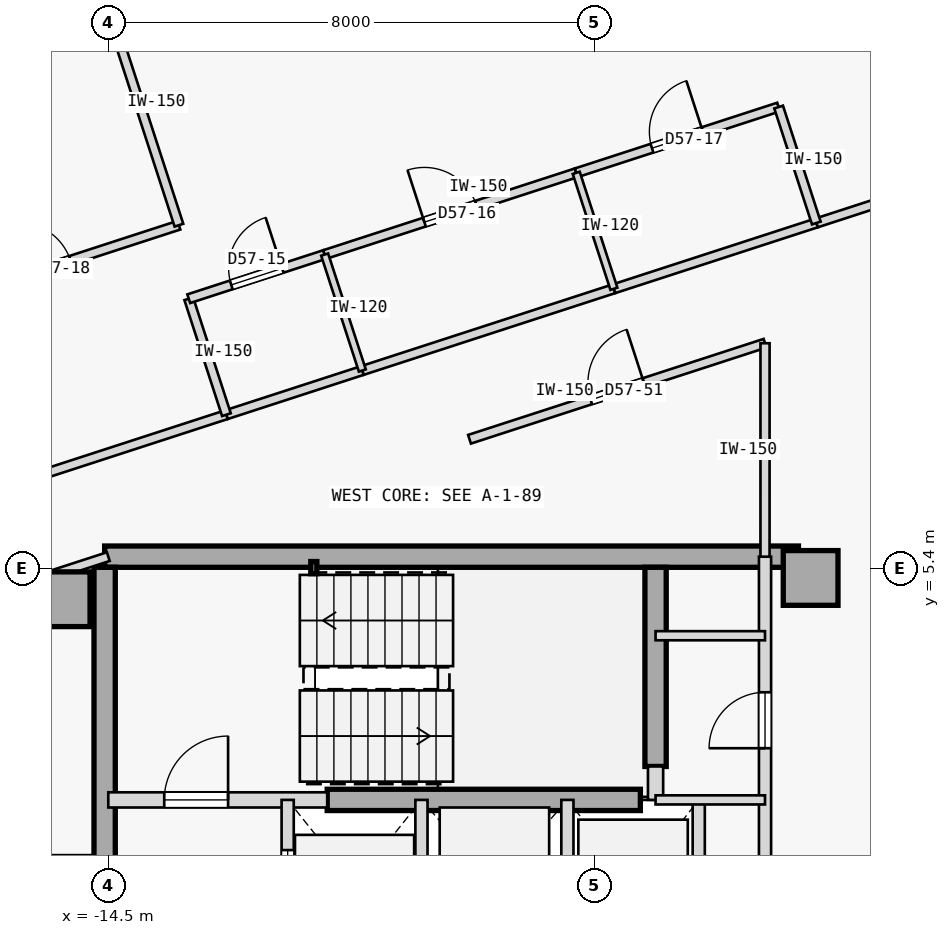
"""IFC4 building model, lengths in metres.
Left out: names, types, materials, properties, quantities, classifications, styles, units other than length and angle.
Written with IfcOpenShell. Run it as: python <this file> out.ifc"""

import sys

from ifc_helpers import new_model, si_unit, direction, frame, frame_2d, origin, origin_2d, place, context, subcontext, project, spatial, rectangle, hollow_rectangle, extrude, element, fill, save


model = new_model("IFC4")
c1 = context("Model", 3, precision=1e-05, world=origin(), true_north=direction((0.0, 1.0)))
c2 = subcontext(c1, "Body", "Model", "MODEL_VIEW")
j1 = project(units=[si_unit("LENGTHUNIT", "METRE"), si_unit("PLANEANGLEUNIT", "RADIAN")], contexts=[c1])
p1 = place(None, origin())
s1 = spatial("IfcSite", under=j1, at=p1, CompositionType="ELEMENT")
p2 = place(p1, origin())
s2 = spatial("IfcBuilding", under=s1, at=p2, CompositionType="ELEMENT")
p3 = place(p2, frame((0.0, 0.0, 217.6)))
s3 = spatial("IfcBuildingStorey", under=s2, at=p3, CompositionType="ELEMENT", Elevation=217.6)
for number, where, z_axis, x_axis in (
    (1, (-15.25, 4.9, 0.0), (0.0, 0.0, 1.0), (1.0, 0.0, 0.0)),
    (2, (-2.95, 5.25, 0.0), (0.0, 0.0, 1.0), (1.0, 0.0, 0.0)),
):
    element("IfcColumn", number, at=place(p3, frame(where, z_axis=z_axis, x_axis=x_axis)), inside=s3, PredefinedType="COLUMN", context=c2, shape_type="SweptSolid", body=[
        extrude(rectangle(XDim=0.9, YDim=0.9, at=origin_2d()), origin(), (0.0, 0.0, 1.0), 3.35),
    ])
p4 = place(p3, frame((-14.56, 5.6, 0.0), z_axis=(0.0, 0.0, 1.0), x_axis=(1.0, 0.0, 0.0)))
e3 = element("IfcWall", 3, at=p4, inside=s3, PredefinedType="SHEAR", context=c2, shape_type="SweptSolid", body=[
    extrude(rectangle(XDim=11.41, YDim=0.35, at=frame_2d((5.705, 0.0))), origin(), (0.0, 0.0, 1.0), 3.125),
])
p5 = place(p3, frame((-14.56, -5.425, 0.0), z_axis=(0.0, 0.0, 1.0), x_axis=(0.0, 1.0, 0.0)))
e4 = element("IfcWall", 4, at=p5, inside=s3, PredefinedType="SHEAR", context=c2, shape_type="SweptSolid", body=[
    extrude(rectangle(XDim=10.85, YDim=0.35, at=frame_2d((5.425, 0.0))), origin(), (0.0, 0.0, 1.0), 3.125),
])
p6 = place(p3, frame((-5.5, 2.15, 0.0), z_axis=(0.0, 0.0, 1.0), x_axis=(0.0, 1.0, 0.0)))
e5 = element("IfcWall", 5, at=p6, inside=s3, PredefinedType="SHEAR", context=c2, shape_type="SweptSolid", body=[
    extrude(rectangle(XDim=3.275, YDim=0.35, at=frame_2d((1.638, 0.0))), origin(), (0.0, 0.0, 1.0), 3.125),
])
p7 = place(p3, frame((-10.9, 1.6, 0.0), z_axis=(0.0, 0.0, 1.0), x_axis=(1.0, 0.0, 0.0)))
e6 = element("IfcWall", 6, at=p7, inside=s3, PredefinedType="SHEAR", context=c2, shape_type="SweptSolid", body=[
    extrude(rectangle(XDim=5.15, YDim=0.35, at=frame_2d((2.575, 0.0))), origin(), (0.0, 0.0, 1.0), 3.125),
])
p8 = place(p3, frame((-11.12, 5.42, 0.0), z_axis=(0.0, 0.0, 1.0), x_axis=(1.0, 0.0, 0.0)))
e7 = element("IfcColumn", 7, at=p8, inside=s3, PredefinedType="COLUMN", context=c2, shape_type="SweptSolid", body=[
    extrude(hollow_rectangle(XDim=0.1, YDim=0.2, WallThickness=0.008, at=origin_2d()), origin(), (0.0, 0.0, 1.0), 3.35),
])
p9 = place(p3, frame((-14.5, 1.6, 0.0), z_axis=(0.0, 0.0, 1.0), x_axis=(1.0, 0.0, 0.0)))
e8 = element("IfcWall", 8, at=p9, inside=s3, PredefinedType="STANDARD", context=c2, shape_type="SweptSolid", body=[
    extrude(rectangle(XDim=3.6, YDim=0.25, at=frame_2d((1.8, 0.0))), origin(), (0.0, 0.0, 1.0), 3.125),
])
p10 = place(p9, frame((0.92, 0.0, 0.0)))
e9 = element("IfcOpeningElement", 9, at=p10, cuts=e8, PredefinedType="OPENING", context=c2, shape_type="SweptSolid", body=[
    extrude(rectangle(XDim=1.05, YDim=2.15, at=frame_2d((0.525, 1.075))), frame((0.0, 0.135, 0.0), z_axis=(0.0, -1.0, 0.0), x_axis=(1.0, 0.0, 0.0)), (0.0, 0.0, 1.0), 0.27),
])
p11 = place(p3, frame((-5.5, 1.6, 0.0), z_axis=(0.0, 0.0, 1.0), x_axis=(0.0, 1.0, 0.0)))
e10 = element("IfcWall", 10, at=p11, inside=s3, PredefinedType="STANDARD", context=c2, shape_type="SweptSolid", body=[
    extrude(rectangle(XDim=0.55, YDim=0.25, at=frame_2d((0.275, 0.0))), origin(), (0.0, 0.0, 1.0), 3.125),
])
p12 = place(p3, frame((-3.7, -1.15, 0.0), z_axis=(0.0, 0.0, 1.0), x_axis=(0.0, 1.0, 0.0)))
e11 = element("IfcWall", 11, at=p12, inside=s3, PredefinedType="STANDARD", context=c2, shape_type="SweptSolid", body=[
    extrude(rectangle(XDim=6.75, YDim=0.2, at=frame_2d((3.375, 0.0))), origin(), (0.0, 0.0, 1.0), 3.125),
])
p13 = place(p12, frame((3.6, 0.0, 0.0)))
e12 = element("IfcOpeningElement", 12, at=p13, cuts=e11, PredefinedType="OPENING", context=c2, shape_type="SweptSolid", body=[
    extrude(rectangle(XDim=0.92, YDim=2.15, at=frame_2d((0.46, 1.075))), frame((0.0, 0.11, 0.0), z_axis=(0.0, -1.0, 0.0), x_axis=(1.0, 0.0, 0.0)), (0.0, 0.0, 1.0), 0.22),
])
p14 = place(p12, frame((0.85, 0.0, 0.0)))
e13 = element("IfcOpeningElement", 13, at=p14, cuts=e11, PredefinedType="OPENING", context=c2, shape_type="SweptSolid", body=[
    extrude(rectangle(XDim=0.9, YDim=2.15, at=frame_2d((0.45, 1.075))), frame((0.0, 0.11, 0.0), z_axis=(0.0, -1.0, 0.0), x_axis=(1.0, 0.0, 0.0)), (0.0, 0.0, 1.0), 0.22),
])
p15 = place(p3, frame((-11.55, -1.15, 0.0), z_axis=(0.0, 0.0, 1.0), x_axis=(0.0, 1.0, 0.0)))
e14 = element("IfcWall", 14, at=p15, inside=s3, PredefinedType="STANDARD", context=c2, shape_type="SweptSolid", body=[
    extrude(rectangle(XDim=2.75, YDim=0.2, at=frame_2d((1.375, 0.0))), origin(), (0.0, 0.0, 1.0), 3.125),
])
p16 = place(p15, frame((0.825, 0.0, 0.0)))
e15 = element("IfcOpeningElement", 15, at=p16, cuts=e14, PredefinedType="OPENING", context=c2, shape_type="SweptSolid", body=[
    extrude(rectangle(XDim=1.1, YDim=2.15, at=frame_2d((0.55, 1.075))), frame((0.0, 0.11, 0.0), z_axis=(0.0, -1.0, 0.0), x_axis=(1.0, 0.0, 0.0)), (0.0, 0.0, 1.0), 0.22),
])
for number, where, z_axis, x_axis in (
    (16, (-9.35, -1.15, 0.0), (0.0, 0.0, 1.0), (0.0, 1.0, 0.0)),
    (17, (-6.95, -1.15, 0.0), (0.0, 0.0, 1.0), (0.0, 1.0, 0.0)),
    (18, (-4.79, -1.15, 0.0), (0.0, 0.0, 1.0), (0.0, 1.0, 0.0)),
):
    element("IfcWall", number, at=place(p3, frame(where, z_axis=z_axis, x_axis=x_axis)), inside=s3, PredefinedType="STANDARD", context=c2, shape_type="SweptSolid", body=[
        extrude(rectangle(XDim=2.75, YDim=0.2, at=frame_2d((1.375, 0.0))), origin(), (0.0, 0.0, 1.0), 3.125),
    ])
for number, where, z_axis, x_axis in (
    (19, (-5.5, 4.3, 0.0), (0.0, 0.0, 1.0), (1.0, 0.0, 0.0)),
    (20, (-5.5, 1.6, 0.0), (0.0, 0.0, 1.0), (1.0, 0.0, 0.0)),
):
    element("IfcWall", number, at=place(p3, frame(where, z_axis=z_axis, x_axis=x_axis)), inside=s3, PredefinedType="PARTITIONING", context=c2, shape_type="SweptSolid", body=[
        extrude(rectangle(XDim=1.8, YDim=0.15, at=frame_2d((0.9, 0.0))), origin(), (0.0, 0.0, 1.0), 3.125),
    ])
p17 = place(p3, frame((-16.865, 6.535, 0.0), z_axis=(0.0, 0.0, 1.0), x_axis=(0.951049118272, 0.309039762222, 0.0)))
e21 = element("IfcWall", 21, at=p17, inside=s3, PredefinedType="PARTITIONING", context=c2, shape_type="SweptSolid", body=[
    extrude(rectangle(XDim=4.53, YDim=0.15, at=frame_2d((2.265, 0.0))), origin(), (0.0, 0.0, 1.0), 3.125),
])
p18 = place(p3, frame((-2.856, 11.087, 0.0), z_axis=(0.0, 0.0, 1.0), x_axis=(0.95106314138, 0.308996603718, 0.0)))
e22 = element("IfcWall", 22, at=p18, inside=s3, PredefinedType="PARTITIONING", context=c2, shape_type="SweptSolid", body=[
    extrude(rectangle(XDim=5.862, YDim=0.15, at=frame_2d((2.931, 0.0))), origin(), (0.0, 0.0, 1.0), 3.125),
])
p19 = place(p18, frame((2.456, 0.0, 0.0)))
e23 = element("IfcOpeningElement", 23, at=p19, cuts=e22, PredefinedType="OPENING", context=c2, shape_type="SweptSolid", body=[
    extrude(rectangle(XDim=0.95, YDim=2.15, at=frame_2d((0.475, 1.075))), frame((0.0, 0.085, 0.0), z_axis=(0.0, -1.0, 0.0), x_axis=(1.0, 0.0, 0.0)), (0.0, 0.0, 1.0), 0.17),
])
p20 = place(p3, frame((-12.557, 7.935, 0.0), z_axis=(0.0, 0.0, 1.0), x_axis=(0.951045519245, 0.309050837767, 0.0)))
e24 = element("IfcWall", 24, at=p20, inside=s3, PredefinedType="PARTITIONING", context=c2, shape_type="SweptSolid", body=[
    extrude(rectangle(XDim=2.35, YDim=0.15, at=frame_2d((1.175, 0.0))), origin(), (0.0, 0.0, 1.0), 3.125),
])
p21 = place(p3, frame((-10.322, 8.661, 0.0), z_axis=(0.0, 0.0, 1.0), x_axis=(0.951052627573, 0.309028962374, 0.0)))
e25 = element("IfcWall", 25, at=p21, inside=s3, PredefinedType="PARTITIONING", context=c2, shape_type="SweptSolid", body=[
    extrude(rectangle(XDim=4.35, YDim=0.15, at=frame_2d((2.175, 0.0))), origin(), (0.0, 0.0, 1.0), 3.125),
])
p22 = place(p3, frame((-6.185, 10.006, 0.0), z_axis=(0.0, 0.0, 1.0), x_axis=(0.951062257173, 0.308999325213, 0.0)))
e26 = element("IfcWall", 26, at=p22, inside=s3, PredefinedType="PARTITIONING", context=c2, shape_type="SweptSolid", body=[
    extrude(rectangle(XDim=3.5, YDim=0.15, at=frame_2d((1.75, 0.0))), origin(), (0.0, 0.0, 1.0), 3.125),
])
p23 = place(p3, frame((-17.792, 4.531, 0.0), z_axis=(0.0, 0.0, 1.0), x_axis=(0.951047546178, 0.309044600193, 0.0)))
e27 = element("IfcWall", 27, at=p23, inside=s3, PredefinedType="PARTITIONING", context=c2, shape_type="SweptSolid", body=[
    extrude(rectangle(XDim=3.461, YDim=0.15, at=frame_2d((1.73, 0.0))), origin(), (0.0, 0.0, 1.0), 3.125),
])
p24 = place(p23, frame((0.302, 0.0, 0.0)))
e28 = element("IfcOpeningElement", 28, at=p24, cuts=e27, PredefinedType="OPENING", context=c2, shape_type="SweptSolid", body=[
    extrude(rectangle(XDim=0.92, YDim=2.15, at=frame_2d((0.46, 1.075))), frame((0.0, 0.085, 0.0), z_axis=(0.0, -1.0, 0.0), x_axis=(1.0, 0.0, 0.0)), (0.0, 0.0, 1.0), 0.17),
])
p25 = place(p3, frame((-8.56, 7.531, 0.0), z_axis=(0.0, 0.0, 1.0), x_axis=(0.951054430751, 0.309023412946, 0.0)))
e29 = element("IfcWall", 29, at=p25, inside=s3, PredefinedType="PARTITIONING", context=c2, shape_type="SweptSolid", body=[
    extrude(rectangle(XDim=5.11, YDim=0.15, at=frame_2d((2.555, 0.0))), origin(), (0.0, 0.0, 1.0), 3.125),
])
p26 = place(p25, frame((2.095, 0.0, 0.0)))
e30 = element("IfcOpeningElement", 30, at=p26, cuts=e29, PredefinedType="OPENING", context=c2, shape_type="SweptSolid", body=[
    extrude(rectangle(XDim=0.92, YDim=2.15, at=frame_2d((0.46, 1.075))), frame((0.0, 0.085, 0.0), z_axis=(0.0, -1.0, 0.0), x_axis=(1.0, 0.0, 0.0)), (0.0, 0.0, 1.0), 0.17),
])
p27 = place(p3, frame((-3.7, 5.6, 0.0), z_axis=(0.0, 0.0, 1.0), x_axis=(0.000139120755, 0.999999990323, 0.0)))
e31 = element("IfcWall", 31, at=p27, inside=s3, PredefinedType="PARTITIONING", context=c2, shape_type="SweptSolid", body=[
    extrude(rectangle(XDim=3.51, YDim=0.15, at=frame_2d((1.755, 0.0))), origin(), (0.0, 0.0, 1.0), 3.125),
])
p28 = place(p3, frame((-12.557, 7.935, 0.0), z_axis=(0.0, 0.0, 1.0), x_axis=(-0.308912611775, 0.951090425925, 0.0)))
e32 = element("IfcWall", 32, at=p28, inside=s3, PredefinedType="PARTITIONING", context=c2, shape_type="SweptSolid", body=[
    extrude(rectangle(XDim=2.005, YDim=0.15, at=frame_2d((1.002, 0.0))), origin(), (0.0, 0.0, 1.0), 3.125),
])
p29 = place(p3, frame((-13.177, 9.842, 0.0), z_axis=(0.0, 0.0, 1.0), x_axis=(0.951066131077, 0.308987401554, 0.0)))
e33 = element("IfcWall", 33, at=p29, inside=s3, PredefinedType="PARTITIONING", context=c2, shape_type="SweptSolid", body=[
    extrude(rectangle(XDim=2.35, YDim=0.15, at=frame_2d((1.175, 0.0))), origin(), (0.0, 0.0, 1.0), 3.125),
])
p30 = place(p29, frame((0.735, 0.0, 0.0)))
e34 = element("IfcOpeningElement", 34, at=p30, cuts=e33, PredefinedType="OPENING", context=c2, shape_type="SweptSolid", body=[
    extrude(rectangle(XDim=0.88, YDim=2.15, at=frame_2d((0.44, 1.075))), frame((0.0, 0.085, 0.0), z_axis=(0.0, -1.0, 0.0), x_axis=(1.0, 0.0, 0.0)), (0.0, 0.0, 1.0), 0.17),
])
p31 = place(p3, frame((-10.942, 10.568, 0.0), z_axis=(0.0, 0.0, 1.0), x_axis=(0.951057987102, 0.309012467661, 0.0)))
e35 = element("IfcWall", 35, at=p31, inside=s3, PredefinedType="PARTITIONING", context=c2, shape_type="SweptSolid", body=[
    extrude(rectangle(XDim=4.35, YDim=0.15, at=frame_2d((2.175, 0.0))), origin(), (0.0, 0.0, 1.0), 3.125),
])
p32 = place(p31, frame((1.725, 0.0, 0.0)))
e36 = element("IfcOpeningElement", 36, at=p32, cuts=e35, PredefinedType="OPENING", context=c2, shape_type="SweptSolid", body=[
    extrude(rectangle(XDim=0.9, YDim=2.15, at=frame_2d((0.45, 1.075))), frame((0.0, 0.085, 0.0), z_axis=(0.0, -1.0, 0.0), x_axis=(1.0, 0.0, 0.0)), (0.0, 0.0, 1.0), 0.17),
])
p33 = place(p3, frame((-6.805, 11.912, 0.0), z_axis=(0.0, 0.0, 1.0), x_axis=(0.951055596592, 0.309019824916, 0.0)))
e37 = element("IfcWall", 37, at=p33, inside=s3, PredefinedType="PARTITIONING", context=c2, shape_type="SweptSolid", body=[
    extrude(rectangle(XDim=3.5, YDim=0.15, at=frame_2d((1.75, 0.0))), origin(), (0.0, 0.0, 1.0), 3.125),
])
p34 = place(p33, frame((1.31, 0.0, 0.0)))
e38 = element("IfcOpeningElement", 38, at=p34, cuts=e37, PredefinedType="OPENING", context=c2, shape_type="SweptSolid", body=[
    extrude(rectangle(XDim=0.88, YDim=2.15, at=frame_2d((0.44, 1.075))), frame((0.0, 0.085, 0.0), z_axis=(0.0, -1.0, 0.0), x_axis=(1.0, 0.0, 0.0)), (0.0, 0.0, 1.0), 0.17),
])
p35 = place(p3, frame((-2.856, 11.087, 0.0), z_axis=(0.0, 0.0, 1.0), x_axis=(-0.309058537449, 0.951043017129, 0.0)))
e39 = element("IfcWall", 39, at=p35, inside=s3, PredefinedType="PARTITIONING", context=c2, shape_type="SweptSolid", body=[
    extrude(rectangle(XDim=2.005, YDim=0.15, at=frame_2d((1.002, 0.0))), origin(), (0.0, 0.0, 1.0), 3.125),
])
p36 = place(p3, frame((-17.761, 9.614, 0.0), z_axis=(0.0, 0.0, 1.0), x_axis=(0.951050272606, 0.309036209813, 0.0)))
e40 = element("IfcWall", 40, at=p36, inside=s3, PredefinedType="PARTITIONING", context=c2, shape_type="SweptSolid", body=[
    extrude(rectangle(XDim=4.65, YDim=0.15, at=frame_2d((2.325, 0.0))), origin(), (0.0, 0.0, 1.0), 3.125),
])
p37 = place(p36, frame((1.875, 0.0, 0.0)))
e41 = element("IfcOpeningElement", 41, at=p37, cuts=e40, PredefinedType="OPENING", context=c2, shape_type="SweptSolid", body=[
    extrude(rectangle(XDim=0.9, YDim=2.15, at=frame_2d((0.45, 1.075))), frame((0.0, 0.085, 0.0), z_axis=(0.0, -1.0, 0.0), x_axis=(1.0, 0.0, 0.0)), (0.0, 0.0, 1.0), 0.17),
])
p38 = place(p3, frame((-13.338, 11.051, 0.0), z_axis=(0.0, 0.0, 1.0), x_axis=(-0.309018403393, 0.951056058476, 0.0)))
e42 = element("IfcWall", 42, at=p38, inside=s3, PredefinedType="PARTITIONING", context=c2, shape_type="SweptSolid", body=[
    extrude(rectangle(XDim=4.079, YDim=0.15, at=frame_2d((2.04, 0.0))), origin(), (0.0, 0.0, 1.0), 3.125),
])
for number, where, z_axis, x_axis in (
    (43, (-10.322, 8.661, 0.0), (0.0, 0.0, 1.0), (-0.309, 0.951, 0.0)),
    (44, (-6.185, 10.006, 0.0), (0.0, 0.0, 1.0), (-0.309, 0.951, 0.0)),
):
    element("IfcWall", number, at=place(p3, frame(where, z_axis=z_axis, x_axis=x_axis)), inside=s3, PredefinedType="PARTITIONING", context=c2, shape_type="SweptSolid", body=[
        extrude(rectangle(XDim=2.005, YDim=0.12, at=frame_2d((1.002, 0.0))), origin(), (0.0, 0.0, 1.0), 3.125),
    ])
p39 = place(p10, origin())
e45 = element("IfcDoor", 45, at=p39, inside=s3, OperationType="SINGLE_SWING_RIGHT", PredefinedType="DOOR", context=c2, shape_type="SweptSolid", body=[
    extrude(rectangle(XDim=1.05, YDim=2.15, at=frame_2d((0.525, 1.075))), frame((0.0, 0.025, 0.0), z_axis=(0.0, -1.0, 0.0), x_axis=(1.0, 0.0, 0.0)), (0.0, 0.0, 1.0), 0.05),
])
fill(e9, e45)
p40 = place(p16, origin())
e46 = element("IfcDoor", 46, at=p40, inside=s3, OperationType="SLIDING_TO_RIGHT", PredefinedType="DOOR", context=c2, shape_type="SweptSolid", body=[
    extrude(rectangle(XDim=1.1, YDim=2.15, at=frame_2d((0.55, 1.075))), frame((0.0, 0.025, 0.0), z_axis=(0.0, -1.0, 0.0), x_axis=(1.0, 0.0, 0.0)), (0.0, 0.0, 1.0), 0.05),
])
fill(e15, e46)
p41 = place(p13, origin())
e47 = element("IfcDoor", 47, at=p41, inside=s3, OperationType="SINGLE_SWING_LEFT", PredefinedType="DOOR", context=c2, shape_type="SweptSolid", body=[
    extrude(rectangle(XDim=0.92, YDim=2.15, at=frame_2d((0.46, 1.075))), frame((0.0, 0.025, 0.0), z_axis=(0.0, -1.0, 0.0), x_axis=(1.0, 0.0, 0.0)), (0.0, 0.0, 1.0), 0.05),
])
fill(e12, e47)
p42 = place(p30, origin())
e48 = element("IfcDoor", 48, at=p42, inside=s3, OperationType="SINGLE_SWING_RIGHT", PredefinedType="DOOR", context=c2, shape_type="SweptSolid", body=[
    extrude(rectangle(XDim=0.88, YDim=2.15, at=frame_2d((0.44, 1.075))), frame((0.0, 0.025, 0.0), z_axis=(0.0, -1.0, 0.0), x_axis=(1.0, 0.0, 0.0)), (0.0, 0.0, 1.0), 0.05),
])
fill(e34, e48)
p43 = place(p32, origin())
e49 = element("IfcDoor", 49, at=p43, inside=s3, OperationType="SINGLE_SWING_LEFT", PredefinedType="DOOR", context=c2, shape_type="SweptSolid", body=[
    extrude(rectangle(XDim=0.9, YDim=2.15, at=frame_2d((0.45, 1.075))), frame((0.0, 0.025, 0.0), z_axis=(0.0, -1.0, 0.0), x_axis=(1.0, 0.0, 0.0)), (0.0, 0.0, 1.0), 0.05),
])
fill(e36, e49)
p44 = place(p34, origin())
e50 = element("IfcDoor", 50, at=p44, inside=s3, OperationType="SINGLE_SWING_RIGHT", PredefinedType="DOOR", context=c2, shape_type="SweptSolid", body=[
    extrude(rectangle(XDim=0.88, YDim=2.15, at=frame_2d((0.44, 1.075))), frame((0.0, 0.025, 0.0), z_axis=(0.0, -1.0, 0.0), x_axis=(1.0, 0.0, 0.0)), (0.0, 0.0, 1.0), 0.05),
])
fill(e38, e50)
p45 = place(p37, origin())
e51 = element("IfcDoor", 51, at=p45, inside=s3, OperationType="SINGLE_SWING_LEFT", PredefinedType="DOOR", context=c2, shape_type="SweptSolid", body=[
    extrude(rectangle(XDim=0.9, YDim=2.15, at=frame_2d((0.45, 1.075))), frame((0.0, 0.025, 0.0), z_axis=(0.0, -1.0, 0.0), x_axis=(1.0, 0.0, 0.0)), (0.0, 0.0, 1.0), 0.05),
])
fill(e41, e51)
p46 = place(p26, origin())
e52 = element("IfcDoor", 52, at=p46, inside=s3, OperationType="SINGLE_SWING_RIGHT", PredefinedType="DOOR", context=c2, shape_type="SweptSolid", body=[
    extrude(rectangle(XDim=0.92, YDim=2.15, at=frame_2d((0.46, 1.075))), frame((0.0, 0.025, 0.0), z_axis=(0.0, -1.0, 0.0), x_axis=(1.0, 0.0, 0.0)), (0.0, 0.0, 1.0), 0.05),
])
fill(e30, e52)
save(model, sys.argv[1])
